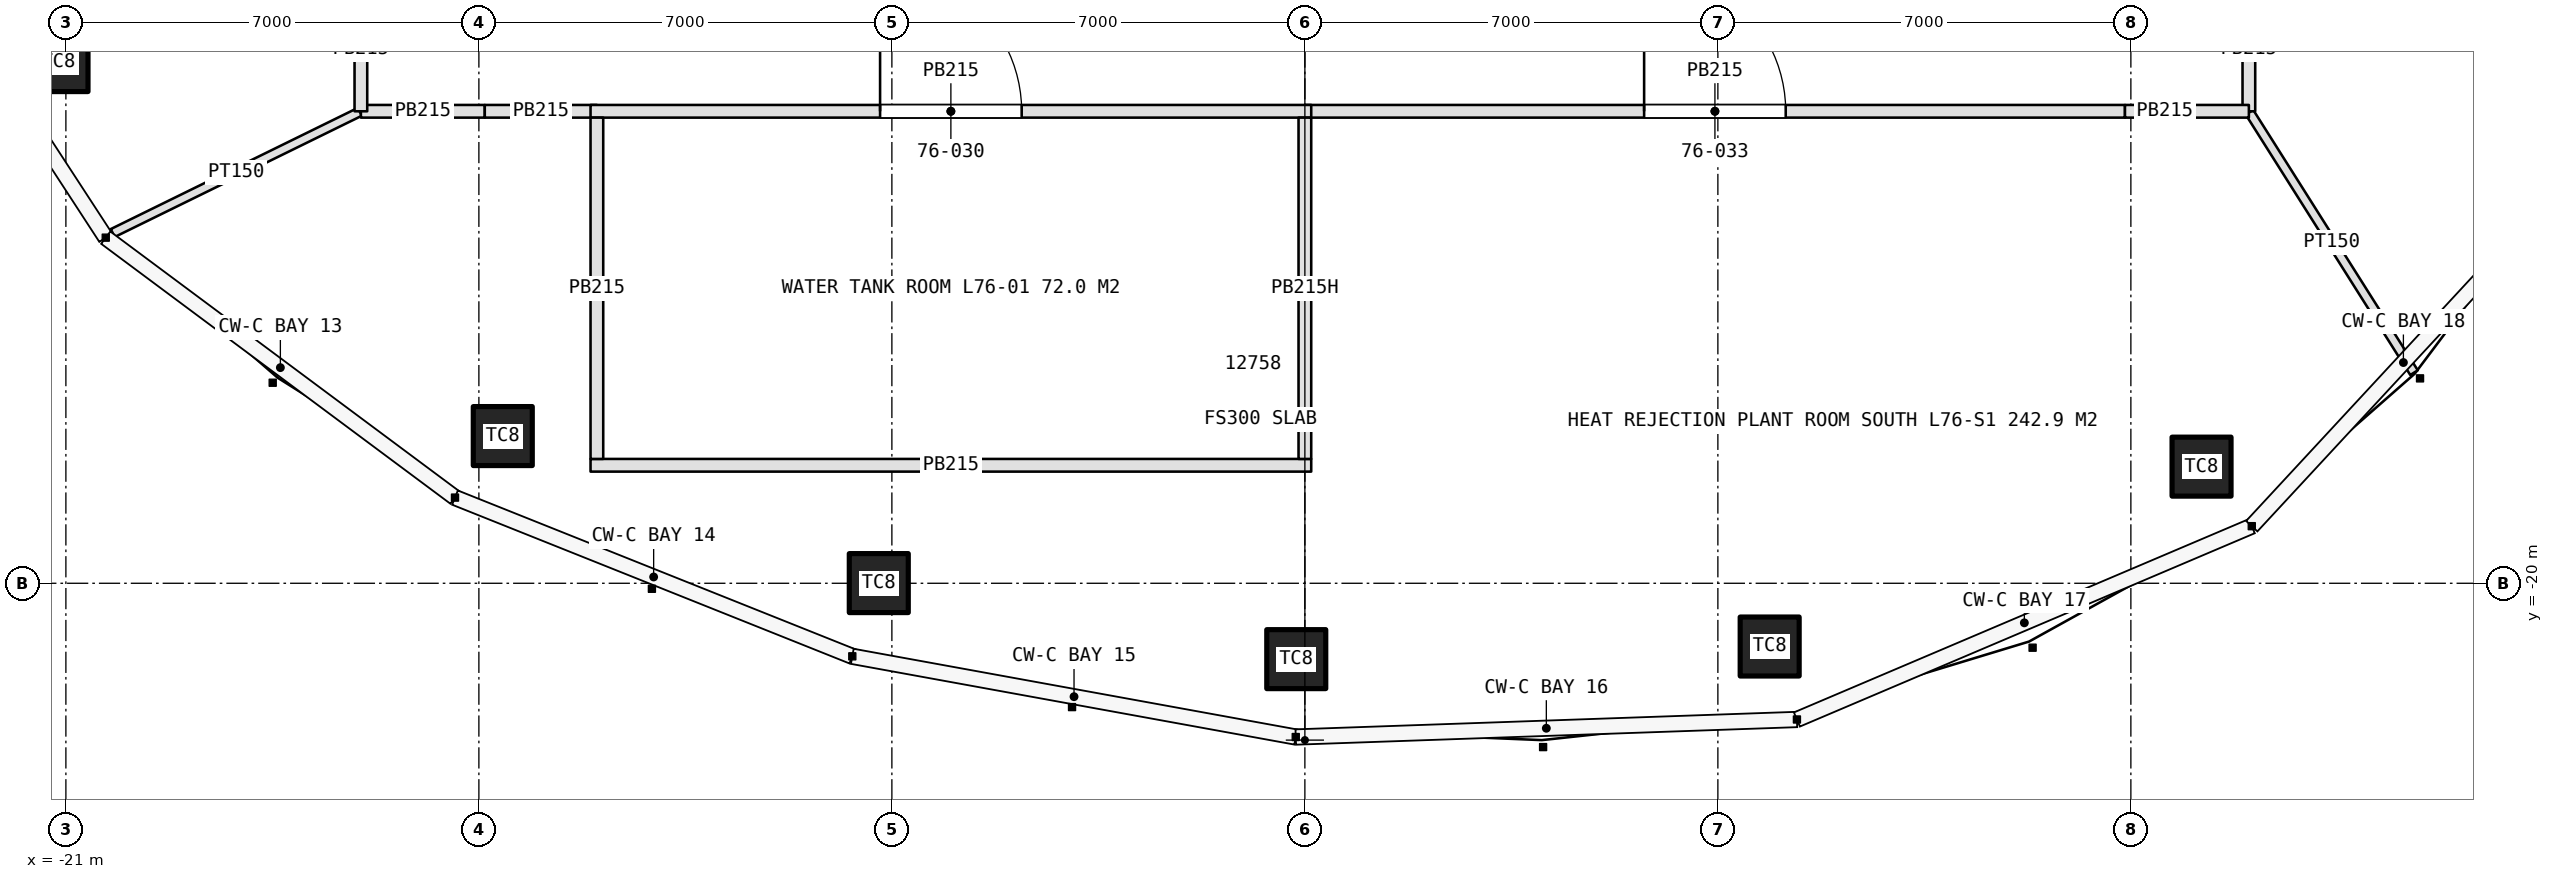
"""IFC4 building model, lengths in metres.
Left out: names, types, materials, properties, quantities, classifications, styles, units other than length and angle.
Written with IfcOpenShell. Run it as: python <this file> out.ifc"""

import sys

from ifc_helpers import new_model, si_unit, direction, frame, frame_2d, origin, origin_2d, place, context, subcontext, project, spatial, rectangle, extrude, element, fill, save


model = new_model("IFC4")
c1 = context("Model", 3, precision=1e-05, world=origin(), true_north=direction((0.0, 1.0)))
c2 = subcontext(c1, "Body", "Model", "MODEL_VIEW")
j1 = project(units=[si_unit("LENGTHUNIT", "METRE"), si_unit("PLANEANGLEUNIT", "RADIAN")], contexts=[c1])
p1 = place(None, origin())
s1 = spatial("IfcSite", under=j1, at=p1, CompositionType="ELEMENT")
p2 = place(p1, origin())
s2 = spatial("IfcBuilding", under=s1, at=p2, CompositionType="ELEMENT")
p3 = place(p2, frame((0.0, 0.0, 339.2)))
s3 = spatial("IfcBuildingStorey", under=s2, at=p3, CompositionType="ELEMENT", Elevation=339.2)
for number, where, z_axis, x_axis in (
    (1, (-21.125, -11.166, 0.0), (0.0, 0.0, 1.0), (1.0, 0.0, 0.0)),
    (2, (-13.595, -17.505, 0.0), (0.0, 0.0, 1.0), (1.0, 0.0, 0.0)),
    (3, (-7.222, -19.997, 0.0), (0.0, 0.0, 1.0), (1.0, 0.0, 0.0)),
    (4, (-0.146, -21.286, 0.0), (0.0, 0.0, 1.0), (1.0, 0.0, 0.0)),
    (5, (7.878, -21.072, 0.0), (0.0, 0.0, 1.0), (1.0, 0.0, 0.0)),
    (6, (15.198, -18.023, 0.0), (0.0, 0.0, 1.0), (1.0, 0.0, 0.0)),
):
    element("IfcColumn", number, at=place(p3, frame(where, z_axis=z_axis, x_axis=x_axis)), inside=s3, PredefinedType="COLUMN", context=c2, shape_type="SweptSolid", body=[
        extrude(rectangle(XDim=1.0, YDim=1.0, at=origin_2d()), origin(), (0.0, 0.0, 1.0), 5.0),
    ])
p4 = place(p3, frame((-16.018, -12.009, 0.0), z_axis=(0.0, 0.0, 1.0), x_axis=(-0.897771840996, -0.440460805879, 0.0)))
e7 = element("IfcWall", 7, at=p4, inside=s3, PredefinedType="PARTITIONING", context=c2, shape_type="SweptSolid", body=[
    extrude(rectangle(XDim=4.666, YDim=0.15, at=frame_2d((2.333, 0.0))), origin(), (0.0, 0.0, 1.0), 4.2),
])
p5 = place(p3, frame((16.011, -12.017, 0.0), z_axis=(0.0, 0.0, 1.0), x_axis=(0.53415837449, -0.845384427916, 0.0)))
e8 = element("IfcWall", 8, at=p5, inside=s3, PredefinedType="PARTITIONING", context=c2, shape_type="SweptSolid", body=[
    extrude(rectangle(XDim=5.22, YDim=0.15, at=frame_2d((2.61, 0.0))), origin(), (0.0, 0.0, 1.0), 4.2),
])
for number, where, z_axis, x_axis in (
    (9, (16.0, -12.0, 0.0), (0.0, 0.0, 1.0), (0.0, 1.0, 0.0)),
    (10, (-16.0, -12.0, 0.0), (0.0, 0.0, 1.0), (1.0, 0.0, 0.0)),
):
    element("IfcWall", number, at=place(p3, frame(where, z_axis=z_axis, x_axis=x_axis)), inside=s3, PredefinedType="PARTITIONING", context=c2, shape_type="SweptSolid", body=[
        extrude(rectangle(XDim=2.1, YDim=0.215, at=frame_2d((1.05, 0.0))), origin(), (0.0, 0.0, 1.0), 4.2),
    ])
p6 = place(p3, frame((-13.9, -12.0, 0.0), z_axis=(0.0, 0.0, 1.0), x_axis=(1.0, 0.0, 0.0)))
e11 = element("IfcWall", 11, at=p6, inside=s3, PredefinedType="PARTITIONING", context=c2, shape_type="SweptSolid", body=[
    extrude(rectangle(XDim=1.9, YDim=0.215, at=frame_2d((0.95, 0.0))), origin(), (0.0, 0.0, 1.0), 4.2),
])
p7 = place(p3, frame((0.0, -12.0, 0.0), z_axis=(0.0, 0.0, 1.0), x_axis=(1.0, 0.0, 0.0)))
e12 = element("IfcWall", 12, at=p7, inside=s3, PredefinedType="PARTITIONING", context=c2, shape_type="SweptSolid", body=[
    extrude(rectangle(XDim=13.9, YDim=0.215, at=frame_2d((6.95, 0.0))), origin(), (0.0, 0.0, 1.0), 4.2),
])
p8 = place(p7, frame((5.75, 0.0, 0.0)))
e13 = element("IfcOpeningElement", 13, at=p8, cuts=e12, PredefinedType="OPENING", context=c2, shape_type="SweptSolid", body=[
    extrude(rectangle(XDim=2.4, YDim=2.4, at=frame_2d((1.2, 1.2))), frame((0.0, 0.118, 0.0), z_axis=(0.0, -1.0, 0.0), x_axis=(1.0, 0.0, 0.0)), (0.0, 0.0, 1.0), 0.235),
])
for number, where, z_axis, x_axis in (
    (14, (13.9, -12.0, 0.0), (0.0, 0.0, 1.0), (1.0, 0.0, 0.0)),
    (15, (-16.0, -9.9, 0.0), (0.0, 0.0, 1.0), (0.0, -1.0, 0.0)),
):
    element("IfcWall", number, at=place(p3, frame(where, z_axis=z_axis, x_axis=x_axis)), inside=s3, PredefinedType="PARTITIONING", context=c2, shape_type="SweptSolid", body=[
        extrude(rectangle(XDim=2.1, YDim=0.215, at=frame_2d((1.05, 0.0))), origin(), (0.0, 0.0, 1.0), 4.2),
    ])
p9 = place(p3, frame((-12.107, -18.0, 0.0), z_axis=(0.0, 0.0, 1.0), x_axis=(1.0, 0.0, 0.0)))
e16 = element("IfcWall", 16, at=p9, inside=s3, PredefinedType="PARTITIONING", context=c2, shape_type="SweptSolid", body=[
    extrude(rectangle(XDim=12.215, YDim=0.215, at=frame_2d((6.107, 0.0))), origin(), (0.0, 0.0, 1.0), 4.2),
])
p10 = place(p3, frame((-12.107, -12.0, 0.0), z_axis=(0.0, 0.0, 1.0), x_axis=(1.0, 0.0, 0.0)))
e17 = element("IfcWall", 17, at=p10, inside=s3, PredefinedType="PARTITIONING", context=c2, shape_type="SweptSolid", body=[
    extrude(rectangle(XDim=12.215, YDim=0.215, at=frame_2d((6.107, 0.0))), origin(), (0.0, 0.0, 1.0), 4.2),
])
p11 = place(p10, frame((4.907, 0.0, 0.0)))
e18 = element("IfcOpeningElement", 18, at=p11, cuts=e17, PredefinedType="OPENING", context=c2, shape_type="SweptSolid", body=[
    extrude(rectangle(XDim=2.4, YDim=2.4, at=frame_2d((1.2, 1.2))), frame((0.0, 0.118, 0.0), z_axis=(0.0, -1.0, 0.0), x_axis=(1.0, 0.0, 0.0)), (0.0, 0.0, 1.0), 0.235),
])
p12 = place(p3, frame((-12.0, -17.893, 0.0), z_axis=(0.0, 0.0, 1.0), x_axis=(0.0, 1.0, 0.0)))
e19 = element("IfcWall", 19, at=p12, inside=s3, PredefinedType="PARTITIONING", context=c2, shape_type="SweptSolid", body=[
    extrude(rectangle(XDim=5.785, YDim=0.215, at=frame_2d((2.893, 0.0))), origin(), (0.0, 0.0, 1.0), 4.2),
])
p13 = place(p3, frame((0.0, -17.893, 0.0), z_axis=(0.0, 0.0, 1.0), x_axis=(0.0, 1.0, 0.0)))
e20 = element("IfcWall", 20, at=p13, inside=s3, PredefinedType="PARTITIONING", context=c2, shape_type="SweptSolid", body=[
    extrude(rectangle(XDim=5.785, YDim=0.215, at=frame_2d((2.893, 0.0))), origin(), (0.0, 0.0, 1.0), 3.773),
])
p14 = place(p11, origin())
e21 = element("IfcDoor", 21, at=p14, inside=s3, OperationType="DOUBLE_DOOR_SINGLE_SWING", PredefinedType="DOOR", context=c2, shape_type="SweptSolid", body=[
    extrude(rectangle(XDim=2.4, YDim=2.4, at=frame_2d((1.2, 1.2))), frame((0.0, 0.025, 0.0), z_axis=(0.0, -1.0, 0.0), x_axis=(1.0, 0.0, 0.0)), (0.0, 0.0, 1.0), 0.05),
])
fill(e18, e21)
p15 = place(p8, origin())
e22 = element("IfcDoor", 22, at=p15, inside=s3, OperationType="DOUBLE_DOOR_SINGLE_SWING", PredefinedType="DOOR", context=c2, shape_type="SweptSolid", body=[
    extrude(rectangle(XDim=2.4, YDim=2.4, at=frame_2d((1.2, 1.2))), frame((0.0, 0.025, 0.0), z_axis=(0.0, -1.0, 0.0), x_axis=(1.0, 0.0, 0.0)), (0.0, 0.0, 1.0), 0.05),
])
fill(e13, e22)
save(model, sys.argv[1])
